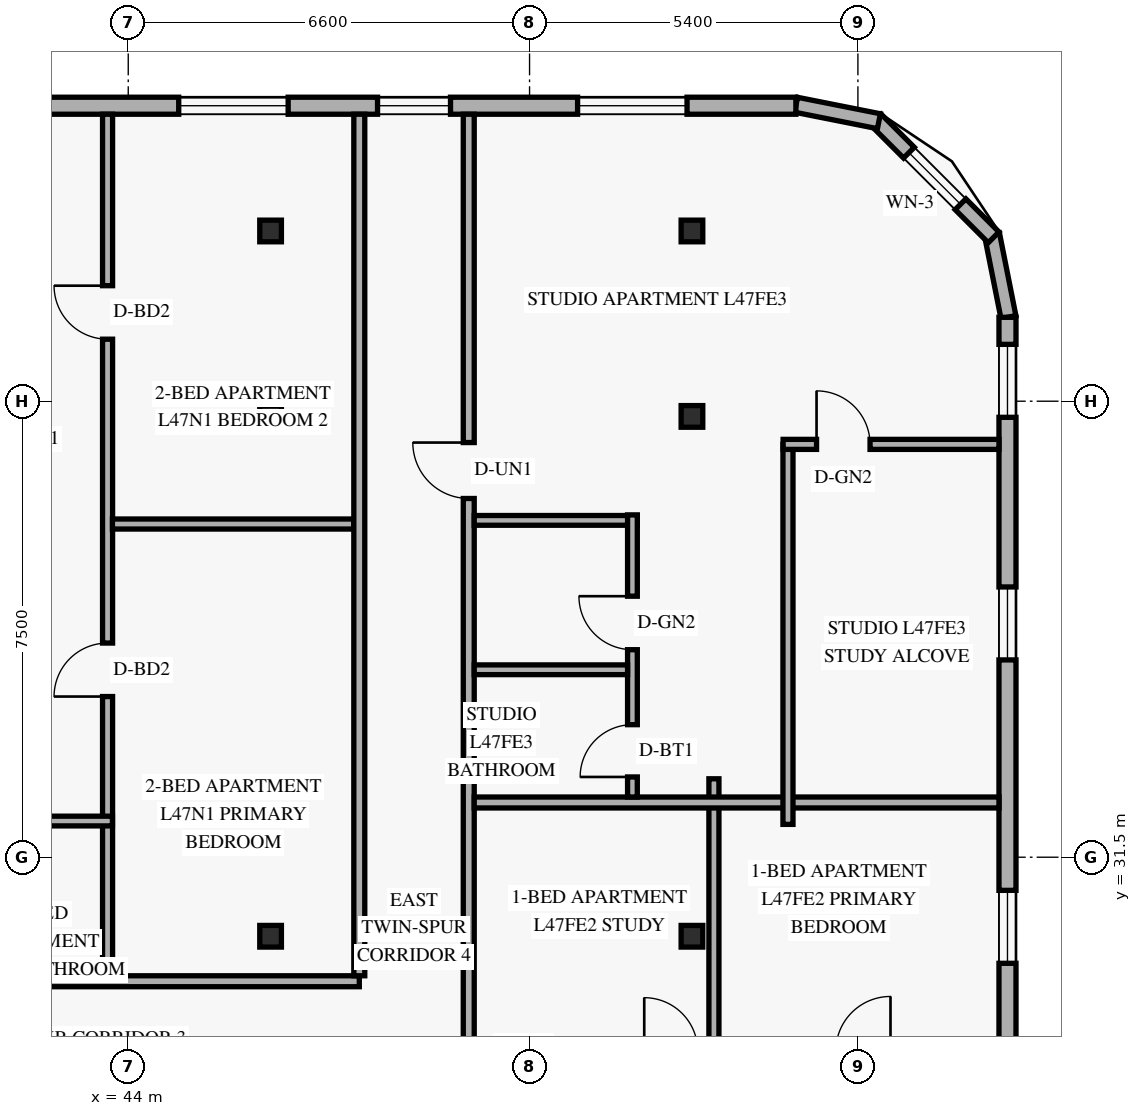
"""IFC4 building model, lengths in metres.
Left out: names, types, materials, properties, quantities, classifications, styles, units other than length and angle.
Written with IfcOpenShell. Run it as: python <this file> out.ifc"""

import sys

from ifc_helpers import new_model, si_unit, direction, frame, frame_2d, origin, origin_2d, place, context, subcontext, project, spatial, rectangle, hollow_rectangle, extrude, element, fill, save


model = new_model("IFC4")
c1 = context("Model", 3, precision=1e-05, world=origin(), true_north=direction((0.0, 1.0)))
c2 = subcontext(c1, "Body", "Model", "MODEL_VIEW")
j1 = project(units=[si_unit("LENGTHUNIT", "METRE"), si_unit("PLANEANGLEUNIT", "RADIAN")], contexts=[c1])
p1 = place(None, origin())
s1 = spatial("IfcSite", under=j1, at=p1, CompositionType="ELEMENT")
p2 = place(p1, origin())
s2 = spatial("IfcBuilding", under=s1, at=p2, CompositionType="ELEMENT")
p3 = place(p2, frame((0.0, 0.0, 181.2)))
s3 = spatial("IfcBuildingStorey", under=s2, at=p3, CompositionType="ELEMENT", Elevation=181.2)
for number, where, z_axis, x_axis in (
    (1, (46.278, 30.2, 0.0), (0.035, 0.0, 0.999), (0.0, 1.0, 0.0)),
    (2, (46.278, 38.75, 0.0), (0.035, 0.0, 0.999), (0.0, 1.0, 0.0)),
    (3, (46.278, 41.8, 0.0), (0.035, 0.0, 0.999), (0.0, 1.0, 0.0)),
):
    element("IfcColumn", number, at=place(p3, frame(where, z_axis=z_axis, x_axis=x_axis)), inside=s3, PredefinedType="COLUMN", context=c2, shape_type="SweptSolid", body=[
        extrude(hollow_rectangle(XDim=0.356, YDim=0.356, WallThickness=0.016, at=origin_2d()), origin(), (0.0, 0.0, 1.0), 3.602),
    ])
for number, where, z_axis, x_axis in (
    (4, (53.167, 30.2, 0.0), (0.058, 0.0, 0.998), (0.0, 1.0, 0.0)),
    (5, (53.167, 38.75, 0.0), (0.058, 0.0, 0.998), (0.0, 1.0, 0.0)),
    (6, (53.167, 41.8, 0.0), (0.058, 0.0, 0.998), (0.0, 1.0, 0.0)),
):
    element("IfcColumn", number, at=place(p3, frame(where, z_axis=z_axis, x_axis=x_axis)), inside=s3, PredefinedType="COLUMN", context=c2, shape_type="SweptSolid", body=[
        extrude(hollow_rectangle(XDim=0.356, YDim=0.356, WallThickness=0.016, at=origin_2d()), origin(), (0.0, 0.0, 1.0), 3.606),
    ])
p4 = place(p3, frame((58.476, 40.384, 0.0), z_axis=(0.0, 0.0, 1.0), x_axis=(-0.19496651342, 0.980809899341, 0.0)))
e7 = element("IfcWall", 7, at=p4, inside=s3, PredefinedType="SOLIDWALL", context=c2, shape_type="SweptSolid", body=[
    extrude(rectangle(XDim=1.389, YDim=0.25, at=frame_2d((0.694, 0.0))), origin(), (0.0, 0.0, 1.0), 3.36),
])
p5 = place(p3, frame((58.232, 41.695, 0.0), z_axis=(0.0, 0.0, 1.0), x_axis=(-0.707106781187, 0.707106781187, 0.0)))
e8 = element("IfcWall", 8, at=p5, inside=s3, PredefinedType="SOLIDWALL", context=c2, shape_type="SweptSolid", body=[
    extrude(rectangle(XDim=2.739, YDim=0.25, at=frame_2d((1.37, 0.0))), origin(), (0.0, 0.0, 1.0), 3.36),
])
p6 = place(p5, frame((0.77, 0.0, 0.85)))
e9 = element("IfcOpeningElement", 9, at=p6, cuts=e8, PredefinedType="OPENING", context=c2, shape_type="SweptSolid", body=[
    extrude(rectangle(XDim=1.2, YDim=1.5, at=frame_2d((0.6, 0.75))), frame((0.0, 0.135, 0.0), z_axis=(0.0, -1.0, 0.0), x_axis=(1.0, 0.0, 0.0)), (0.0, 0.0, 1.0), 0.27),
])
p7 = place(p3, frame((56.345, 43.605, 0.0), z_axis=(0.0, 0.0, 1.0), x_axis=(-0.980809899341, 0.19496651342, 0.0)))
e10 = element("IfcWall", 10, at=p7, inside=s3, PredefinedType="SOLIDWALL", context=c2, shape_type="SweptSolid", body=[
    extrude(rectangle(XDim=1.389, YDim=0.25, at=frame_2d((0.694, 0.0))), origin(), (0.0, 0.0, 1.0), 3.36),
])
p8 = place(p3, frame((58.46, 7.62, 0.0), z_axis=(0.0, 0.0, 1.0), x_axis=(0.0, 1.0, 0.0)))
e11 = element("IfcWall", 11, at=p8, inside=s3, PredefinedType="SOLIDWALL", context=c2, shape_type="SweptSolid", body=[
    extrude(rectangle(XDim=32.76, YDim=0.28, at=frame_2d((16.38, 0.0))), origin(), (0.0, 0.0, 1.0), 3.36),
])
p9 = place(p8, frame((4.79, 0.0, 0.85)))
e12 = element("IfcOpeningElement", 12, at=p9, cuts=e11, PredefinedType="OPENING", context=c2, shape_type="SweptSolid", body=[
    extrude(rectangle(XDim=1.2, YDim=1.5, at=frame_2d((0.6, 0.75))), frame((0.0, 0.15, 0.0), z_axis=(0.0, -1.0, 0.0), x_axis=(1.0, 0.0, 0.0)), (0.0, 0.0, 1.0), 0.3),
])
p10 = place(p8, frame((11.425, 0.0, 0.85)))
e13 = element("IfcOpeningElement", 13, at=p10, cuts=e11, PredefinedType="OPENING", context=c2, shape_type="SweptSolid", body=[
    extrude(rectangle(XDim=1.2, YDim=1.5, at=frame_2d((0.6, 0.75))), frame((0.0, 0.15, 0.0), z_axis=(0.0, -1.0, 0.0), x_axis=(1.0, 0.0, 0.0)), (0.0, 0.0, 1.0), 0.3),
])
p11 = place(p8, frame((16.38, 0.0, 0.85)))
e14 = element("IfcOpeningElement", 14, at=p11, cuts=e11, PredefinedType="OPENING", context=c2, shape_type="SweptSolid", body=[
    extrude(rectangle(XDim=1.2, YDim=1.5, at=frame_2d((0.6, 0.75))), frame((0.0, 0.15, 0.0), z_axis=(0.0, -1.0, 0.0), x_axis=(1.0, 0.0, 0.0)), (0.0, 0.0, 1.0), 0.3),
])
p12 = place(p8, frame((22.135, 0.0, 0.85)))
e15 = element("IfcOpeningElement", 15, at=p12, cuts=e11, PredefinedType="OPENING", context=c2, shape_type="SweptSolid", body=[
    extrude(rectangle(XDim=1.2, YDim=1.5, at=frame_2d((0.6, 0.75))), frame((0.0, 0.15, 0.0), z_axis=(0.0, -1.0, 0.0), x_axis=(1.0, 0.0, 0.0)), (0.0, 0.0, 1.0), 0.3),
])
p13 = place(p8, frame((27.125, 0.0, 0.85)))
e16 = element("IfcOpeningElement", 16, at=p13, cuts=e11, PredefinedType="OPENING", context=c2, shape_type="SweptSolid", body=[
    extrude(rectangle(XDim=1.2, YDim=1.5, at=frame_2d((0.6, 0.75))), frame((0.0, 0.15, 0.0), z_axis=(0.0, -1.0, 0.0), x_axis=(1.0, 0.0, 0.0)), (0.0, 0.0, 1.0), 0.3),
])
p14 = place(p8, frame((31.115, 0.0, 0.85)))
e17 = element("IfcOpeningElement", 17, at=p14, cuts=e11, PredefinedType="OPENING", context=c2, shape_type="SweptSolid", body=[
    extrude(rectangle(XDim=1.2, YDim=1.5, at=frame_2d((0.6, 0.75))), frame((0.0, 0.15, 0.0), z_axis=(0.0, -1.0, 0.0), x_axis=(1.0, 0.0, 0.0)), (0.0, 0.0, 1.0), 0.3),
])
p15 = place(p3, frame((54.98, 43.86, 0.0), z_axis=(0.0, 0.0, 1.0), x_axis=(-1.0, 0.0, 0.0)))
e18 = element("IfcWall", 18, at=p15, inside=s3, PredefinedType="SOLIDWALL", context=c2, shape_type="SweptSolid", body=[
    extrude(rectangle(XDim=33.76, YDim=0.28, at=frame_2d((16.88, 0.0))), origin(), (0.0, 0.0, 1.0), 3.36),
])
p16 = place(p15, frame((28.055, 0.0, 0.85)))
e19 = element("IfcOpeningElement", 19, at=p16, cuts=e18, PredefinedType="OPENING", context=c2, shape_type="SweptSolid", body=[
    extrude(rectangle(XDim=1.8, YDim=1.6, at=frame_2d((0.9, 0.8))), frame((0.0, 0.15, 0.0), z_axis=(0.0, -1.0, 0.0), x_axis=(1.0, 0.0, 0.0)), (0.0, 0.0, 1.0), 0.3),
])
p17 = place(p15, frame((21.17, 0.0, 0.85)))
e20 = element("IfcOpeningElement", 20, at=p17, cuts=e18, PredefinedType="OPENING", context=c2, shape_type="SweptSolid", body=[
    extrude(rectangle(XDim=1.8, YDim=1.6, at=frame_2d((0.9, 0.8))), frame((0.0, 0.15, 0.0), z_axis=(0.0, -1.0, 0.0), x_axis=(1.0, 0.0, 0.0)), (0.0, 0.0, 1.0), 0.3),
])
p18 = place(p15, frame((17.44, 0.0, 0.85)))
e21 = element("IfcOpeningElement", 21, at=p18, cuts=e18, PredefinedType="OPENING", context=c2, shape_type="SweptSolid", body=[
    extrude(rectangle(XDim=1.8, YDim=1.6, at=frame_2d((0.9, 0.8))), frame((0.0, 0.15, 0.0), z_axis=(0.0, -1.0, 0.0), x_axis=(1.0, 0.0, 0.0)), (0.0, 0.0, 1.0), 0.3),
])
p19 = place(p15, frame((13.32, 0.0, 0.85)))
e22 = element("IfcOpeningElement", 22, at=p19, cuts=e18, PredefinedType="OPENING", context=c2, shape_type="SweptSolid", body=[
    extrude(rectangle(XDim=1.8, YDim=1.6, at=frame_2d((0.9, 0.8))), frame((0.0, 0.15, 0.0), z_axis=(0.0, -1.0, 0.0), x_axis=(1.0, 0.0, 0.0)), (0.0, 0.0, 1.0), 0.3),
])
p20 = place(p15, frame((8.35, 0.0, 0.85)))
e23 = element("IfcOpeningElement", 23, at=p20, cuts=e18, PredefinedType="OPENING", context=c2, shape_type="SweptSolid", body=[
    extrude(rectangle(XDim=1.8, YDim=1.6, at=frame_2d((0.9, 0.8))), frame((0.0, 0.15, 0.0), z_axis=(0.0, -1.0, 0.0), x_axis=(1.0, 0.0, 0.0)), (0.0, 0.0, 1.0), 0.3),
])
p21 = place(p15, frame((5.68, 0.0, 0.85)))
e24 = element("IfcOpeningElement", 24, at=p21, cuts=e18, PredefinedType="OPENING", context=c2, shape_type="SweptSolid", body=[
    extrude(rectangle(XDim=1.2, YDim=1.5, at=frame_2d((0.6, 0.75))), frame((0.0, 0.15, 0.0), z_axis=(0.0, -1.0, 0.0), x_axis=(1.0, 0.0, 0.0)), (0.0, 0.0, 1.0), 0.3),
])
p22 = place(p15, frame((1.79, 0.0, 0.85)))
e25 = element("IfcOpeningElement", 25, at=p22, cuts=e18, PredefinedType="OPENING", context=c2, shape_type="SweptSolid", body=[
    extrude(rectangle(XDim=1.8, YDim=1.6, at=frame_2d((0.9, 0.8))), frame((0.0, 0.15, 0.0), z_axis=(0.0, -1.0, 0.0), x_axis=(1.0, 0.0, 0.0)), (0.0, 0.0, 1.0), 0.3),
])
p23 = place(p3, frame((35.51, 29.46, 0.0), z_axis=(0.0, 0.0, 1.0), x_axis=(1.0, 0.0, 0.0)))
e26 = element("IfcWall", 26, at=p23, inside=s3, PredefinedType="STANDARD", context=c2, shape_type="SweptSolid", body=[
    extrude(rectangle(XDim=12.29, YDim=0.18, at=frame_2d((6.145, 0.0))), origin(), (0.0, 0.0, 1.0), 2.73),
])
p24 = place(p23, frame((0.32, 0.0, 0.0)))
e27 = element("IfcOpeningElement", 27, at=p24, cuts=e26, PredefinedType="OPENING", context=c2, shape_type="SweptSolid", body=[
    extrude(rectangle(XDim=0.92, YDim=2.15, at=frame_2d((0.46, 1.075))), frame((0.0, 0.1, 0.0), z_axis=(0.0, -1.0, 0.0), x_axis=(1.0, 0.0, 0.0)), (0.0, 0.0, 1.0), 0.2),
])
p25 = place(p3, frame((43.66, 29.55, 0.0), z_axis=(0.0, 0.0, 1.0), x_axis=(0.0, 1.0, 0.0)))
e28 = element("IfcWall", 28, at=p25, inside=s3, PredefinedType="PARTITIONING", context=c2, shape_type="SweptSolid", body=[
    extrude(rectangle(XDim=14.17, YDim=0.165, at=frame_2d((7.085, 0.0))), origin(), (0.0, 0.0, 1.0), 2.73),
])
p26 = place(p25, frame((4.593, 0.0, 0.0)))
e29 = element("IfcOpeningElement", 29, at=p26, cuts=e28, PredefinedType="OPENING", context=c2, shape_type="SweptSolid", body=[
    extrude(rectangle(XDim=0.88, YDim=2.14, at=frame_2d((0.44, 1.07))), frame((0.0, 0.093, 0.0), z_axis=(0.0, -1.0, 0.0), x_axis=(1.0, 0.0, 0.0)), (0.0, 0.0, 1.0), 0.185),
])
p27 = place(p25, frame((10.47, 0.0, 0.0)))
e30 = element("IfcOpeningElement", 30, at=p27, cuts=e28, PredefinedType="OPENING", context=c2, shape_type="SweptSolid", body=[
    extrude(rectangle(XDim=0.88, YDim=2.14, at=frame_2d((0.44, 1.07))), frame((0.0, 0.093, 0.0), z_axis=(0.0, -1.0, 0.0), x_axis=(1.0, 0.0, 0.0)), (0.0, 0.0, 1.0), 0.185),
])
p28 = place(p3, frame((39.03, 32.095, 0.0), z_axis=(0.0, 0.0, 1.0), x_axis=(1.0, 0.0, 0.0)))
e31 = element("IfcWall", 31, at=p28, inside=s3, PredefinedType="PLUMBINGWALL", context=c2, shape_type="SweptSolid", body=[
    extrude(rectangle(XDim=4.71, YDim=0.16, at=frame_2d((2.355, 0.0))), origin(), (0.0, 0.0, 1.0), 3.36),
])
p29 = place(p28, frame((0.38, 0.0, 0.0)))
e32 = element("IfcOpeningElement", 32, at=p29, cuts=e31, PredefinedType="OPENING", context=c2, shape_type="SweptSolid", body=[
    extrude(rectangle(XDim=0.88, YDim=2.12, at=frame_2d((0.44, 1.06))), frame((0.0, 0.09, 0.0), z_axis=(0.0, -1.0, 0.0), x_axis=(1.0, 0.0, 0.0)), (0.0, 0.0, 1.0), 0.18),
])
p30 = place(p28, frame((2.786, 0.0, 0.0)))
e33 = element("IfcOpeningElement", 33, at=p30, cuts=e31, PredefinedType="OPENING", context=c2, shape_type="SweptSolid", body=[
    extrude(rectangle(XDim=0.86, YDim=2.12, at=frame_2d((0.43, 1.06))), frame((0.0, 0.09, 0.0), z_axis=(0.0, -1.0, 0.0), x_axis=(1.0, 0.0, 0.0)), (0.0, 0.0, 1.0), 0.18),
])
p31 = place(p3, frame((43.74, 36.98, 0.0), z_axis=(0.0, 0.0, 1.0), x_axis=(1.0, 0.0, 0.0)))
e34 = element("IfcWall", 34, at=p31, inside=s3, PredefinedType="PARTITIONING", context=c2, shape_type="SweptSolid", body=[
    extrude(rectangle(XDim=3.97, YDim=0.165, at=frame_2d((1.985, 0.0))), origin(), (0.0, 0.0, 1.0), 2.73),
])
p32 = place(p3, frame((49.6, 4.28, 0.0), z_axis=(0.0, 0.0, 1.0), x_axis=(0.0, 1.0, 0.0)))
e35 = element("IfcWall", 35, at=p32, inside=s3, PredefinedType="STANDARD", context=c2, shape_type="SweptSolid", body=[
    extrude(rectangle(XDim=39.44, YDim=0.18, at=frame_2d((19.72, 0.0))), origin(), (0.0, 0.0, 1.0), 2.73),
])
p33 = place(p32, frame((8.52, 0.0, 0.0)))
e36 = element("IfcOpeningElement", 36, at=p33, cuts=e35, PredefinedType="OPENING", context=c2, shape_type="SweptSolid", body=[
    extrude(rectangle(XDim=0.92, YDim=2.15, at=frame_2d((0.46, 1.075))), frame((0.0, 0.1, 0.0), z_axis=(0.0, -1.0, 0.0), x_axis=(1.0, 0.0, 0.0)), (0.0, 0.0, 1.0), 0.2),
])
p34 = place(p32, frame((18.052, 0.0, 0.0)))
e37 = element("IfcOpeningElement", 37, at=p34, cuts=e35, PredefinedType="OPENING", context=c2, shape_type="SweptSolid", body=[
    extrude(rectangle(XDim=0.92, YDim=2.15, at=frame_2d((0.46, 1.075))), frame((0.0, 0.1, 0.0), z_axis=(0.0, -1.0, 0.0), x_axis=(1.0, 0.0, 0.0)), (0.0, 0.0, 1.0), 0.2),
])
p35 = place(p32, frame((33.12, 0.0, 0.0)))
e38 = element("IfcOpeningElement", 38, at=p35, cuts=e35, PredefinedType="OPENING", context=c2, shape_type="SweptSolid", body=[
    extrude(rectangle(XDim=0.92, YDim=2.15, at=frame_2d((0.46, 1.075))), frame((0.0, 0.1, 0.0), z_axis=(0.0, -1.0, 0.0), x_axis=(1.0, 0.0, 0.0)), (0.0, 0.0, 1.0), 0.2),
])
p36 = place(p3, frame((47.8, 29.55, 0.0), z_axis=(0.0, 0.0, 1.0), x_axis=(0.0, 1.0, 0.0)))
e39 = element("IfcWall", 39, at=p36, inside=s3, PredefinedType="STANDARD", context=c2, shape_type="SweptSolid", body=[
    extrude(rectangle(XDim=14.17, YDim=0.18, at=frame_2d((7.085, 0.0))), origin(), (0.0, 0.0, 1.0), 2.73),
])
p37 = place(p3, frame((53.632, 28.23, 0.0), z_axis=(0.0, 0.0, 1.0), x_axis=(0.0, 1.0, 0.0)))
e40 = element("IfcWall", 40, at=p37, inside=s3, PredefinedType="PARTITIONING", context=c2, shape_type="SweptSolid", body=[
    extrude(rectangle(XDim=4.56, YDim=0.165, at=frame_2d((2.28, 0.0))), origin(), (0.0, 0.0, 1.0), 3.36),
])
p38 = place(p3, frame((49.69, 32.4, 0.0), z_axis=(0.0, 0.0, 1.0), x_axis=(1.0, 0.0, 0.0)))
e41 = element("IfcWall", 41, at=p38, inside=s3, PredefinedType="PARTITIONING", context=c2, shape_type="SweptSolid", body=[
    extrude(rectangle(XDim=8.63, YDim=0.18, at=frame_2d((4.315, 0.0))), origin(), (0.0, 0.0, 1.0), 2.879),
])
p39 = place(p3, frame((49.69, 37.04, 0.0), z_axis=(0.0, 0.0, 1.0), x_axis=(1.0, 0.0, 0.0)))
e42 = element("IfcWall", 42, at=p39, inside=s3, PredefinedType="PLUMBINGWALL", context=c2, shape_type="SweptSolid", body=[
    extrude(rectangle(XDim=2.682, YDim=0.16, at=frame_2d((1.341, 0.0))), origin(), (0.0, 0.0, 1.0), 3.36),
])
p40 = place(p3, frame((52.292, 32.49, 0.0), z_axis=(0.0, 0.0, 1.0), x_axis=(0.0, 1.0, 0.0)))
e43 = element("IfcWall", 43, at=p40, inside=s3, PredefinedType="PLUMBINGWALL", context=c2, shape_type="SweptSolid", body=[
    extrude(rectangle(XDim=4.64, YDim=0.16, at=frame_2d((2.32, 0.0))), origin(), (0.0, 0.0, 1.0), 2.984),
])
p41 = place(p40, frame((0.33, 0.0, 0.0)))
e44 = element("IfcOpeningElement", 44, at=p41, cuts=e43, PredefinedType="OPENING", context=c2, shape_type="SweptSolid", body=[
    extrude(rectangle(XDim=0.86, YDim=2.12, at=frame_2d((0.43, 1.06))), frame((0.0, 0.09, 0.0), z_axis=(0.0, -1.0, 0.0), x_axis=(1.0, 0.0, 0.0)), (0.0, 0.0, 1.0), 0.18),
])
p42 = place(p40, frame((2.423, 0.0, 0.0)))
e45 = element("IfcOpeningElement", 45, at=p42, cuts=e43, PredefinedType="OPENING", context=c2, shape_type="SweptSolid", body=[
    extrude(rectangle(XDim=0.88, YDim=2.12, at=frame_2d((0.44, 1.06))), frame((0.0, 0.09, 0.0), z_axis=(0.0, -1.0, 0.0), x_axis=(1.0, 0.0, 0.0)), (0.0, 0.0, 1.0), 0.18),
])
p43 = place(p3, frame((49.69, 34.583, 0.0), z_axis=(0.0, 0.0, 1.0), x_axis=(1.0, 0.0, 0.0)))
e46 = element("IfcWall", 46, at=p43, inside=s3, PredefinedType="PLUMBINGWALL", context=c2, shape_type="SweptSolid", body=[
    extrude(rectangle(XDim=2.522, YDim=0.16, at=frame_2d((1.261, 0.0))), origin(), (0.0, 0.0, 1.0), 2.984),
])
p44 = place(p3, frame((54.85, 32.04, 0.0), z_axis=(0.0, 0.0, 1.0), x_axis=(0.0, 1.0, 0.0)))
e47 = element("IfcWall", 47, at=p44, inside=s3, PredefinedType="PARTITIONING", context=c2, shape_type="SweptSolid", body=[
    extrude(rectangle(XDim=6.25, YDim=0.165, at=frame_2d((3.125, 0.0))), origin(), (0.0, 0.0, 1.0), 3.36),
])
p45 = place(p3, frame((54.77, 38.29, 0.0), z_axis=(0.0, 0.0, 1.0), x_axis=(1.0, 0.0, 0.0)))
e48 = element("IfcWall", 48, at=p45, inside=s3, PredefinedType="PARTITIONING", context=c2, shape_type="SweptSolid", body=[
    extrude(rectangle(XDim=3.55, YDim=0.165, at=frame_2d((1.775, 0.0))), origin(), (0.0, 0.0, 1.0), 3.36),
])
p46 = place(p45, frame((0.55, 0.0, 0.0)))
e49 = element("IfcOpeningElement", 49, at=p46, cuts=e48, PredefinedType="OPENING", context=c2, shape_type="SweptSolid", body=[
    extrude(rectangle(XDim=0.88, YDim=2.12, at=frame_2d((0.44, 1.06))), frame((0.0, 0.093, 0.0), z_axis=(0.0, -1.0, 0.0), x_axis=(1.0, 0.0, 0.0)), (0.0, 0.0, 1.0), 0.185),
])
p47 = place(p6, origin())
e50 = element("IfcWindow", 50, at=p47, inside=s3, PartitioningType="SINGLE_PANEL", PredefinedType="WINDOW", context=c2, shape_type="SweptSolid", body=[
    extrude(rectangle(XDim=1.2, YDim=1.5, at=frame_2d((0.6, 0.75))), frame((0.0, 0.03, 0.0), z_axis=(0.0, -1.0, 0.0), x_axis=(1.0, 0.0, 0.0)), (0.0, 0.0, 1.0), 0.06),
])
fill(e9, e50)
p48 = place(p12, origin())
e51 = element("IfcWindow", 51, at=p48, inside=s3, PartitioningType="SINGLE_PANEL", PredefinedType="WINDOW", context=c2, shape_type="SweptSolid", body=[
    extrude(rectangle(XDim=1.2, YDim=1.5, at=frame_2d((0.6, 0.75))), frame((0.0, 0.03, 0.0), z_axis=(0.0, -1.0, 0.0), x_axis=(1.0, 0.0, 0.0)), (0.0, 0.0, 1.0), 0.06),
])
fill(e15, e51)
p49 = place(p13, origin())
e52 = element("IfcWindow", 52, at=p49, inside=s3, PartitioningType="SINGLE_PANEL", PredefinedType="WINDOW", context=c2, shape_type="SweptSolid", body=[
    extrude(rectangle(XDim=1.2, YDim=1.5, at=frame_2d((0.6, 0.75))), frame((0.0, 0.03, 0.0), z_axis=(0.0, -1.0, 0.0), x_axis=(1.0, 0.0, 0.0)), (0.0, 0.0, 1.0), 0.06),
])
fill(e16, e52)
p50 = place(p14, origin())
e53 = element("IfcWindow", 53, at=p50, inside=s3, PartitioningType="SINGLE_PANEL", PredefinedType="WINDOW", context=c2, shape_type="SweptSolid", body=[
    extrude(rectangle(XDim=1.2, YDim=1.5, at=frame_2d((0.6, 0.75))), frame((0.0, 0.03, 0.0), z_axis=(0.0, -1.0, 0.0), x_axis=(1.0, 0.0, 0.0)), (0.0, 0.0, 1.0), 0.06),
])
fill(e17, e53)
p51 = place(p20, origin())
e54 = element("IfcWindow", 54, at=p51, inside=s3, PartitioningType="SINGLE_PANEL", PredefinedType="WINDOW", context=c2, shape_type="SweptSolid", body=[
    extrude(rectangle(XDim=1.8, YDim=1.6, at=frame_2d((0.9, 0.8))), frame((0.0, 0.03, 0.0), z_axis=(0.0, -1.0, 0.0), x_axis=(1.0, 0.0, 0.0)), (0.0, 0.0, 1.0), 0.06),
])
fill(e23, e54)
p52 = place(p21, origin())
e55 = element("IfcWindow", 55, at=p52, inside=s3, PartitioningType="SINGLE_PANEL", PredefinedType="WINDOW", context=c2, shape_type="SweptSolid", body=[
    extrude(rectangle(XDim=1.2, YDim=1.5, at=frame_2d((0.6, 0.75))), frame((0.0, 0.03, 0.0), z_axis=(0.0, -1.0, 0.0), x_axis=(1.0, 0.0, 0.0)), (0.0, 0.0, 1.0), 0.06),
])
fill(e24, e55)
p53 = place(p22, origin())
e56 = element("IfcWindow", 56, at=p53, inside=s3, PartitioningType="SINGLE_PANEL", PredefinedType="WINDOW", context=c2, shape_type="SweptSolid", body=[
    extrude(rectangle(XDim=1.8, YDim=1.6, at=frame_2d((0.9, 0.8))), frame((0.0, 0.03, 0.0), z_axis=(0.0, -1.0, 0.0), x_axis=(1.0, 0.0, 0.0)), (0.0, 0.0, 1.0), 0.06),
])
fill(e25, e56)
p54 = place(p26, origin())
e57 = element("IfcDoor", 57, at=p54, inside=s3, OperationType="SINGLE_SWING_LEFT", PredefinedType="DOOR", context=c2, shape_type="SweptSolid", body=[
    extrude(rectangle(XDim=0.88, YDim=2.14, at=frame_2d((0.44, 1.07))), frame((0.0, 0.025, 0.0), z_axis=(0.0, -1.0, 0.0), x_axis=(1.0, 0.0, 0.0)), (0.0, 0.0, 1.0), 0.05),
])
fill(e29, e57)
p55 = place(p27, origin())
e58 = element("IfcDoor", 58, at=p55, inside=s3, OperationType="SINGLE_SWING_RIGHT", PredefinedType="DOOR", context=c2, shape_type="SweptSolid", body=[
    extrude(rectangle(XDim=0.88, YDim=2.14, at=frame_2d((0.44, 1.07))), frame((0.0, 0.025, 0.0), z_axis=(0.0, -1.0, 0.0), x_axis=(1.0, 0.0, 0.0)), (0.0, 0.0, 1.0), 0.05),
])
fill(e30, e58)
p56 = place(p46, origin())
e59 = element("IfcDoor", 59, at=p56, inside=s3, OperationType="SINGLE_SWING_LEFT", PredefinedType="DOOR", context=c2, shape_type="SweptSolid", body=[
    extrude(rectangle(XDim=0.88, YDim=2.12, at=frame_2d((0.44, 1.06))), frame((0.0, 0.025, 0.0), z_axis=(0.0, -1.0, 0.0), x_axis=(1.0, 0.0, 0.0)), (0.0, 0.0, 1.0), 0.05),
])
fill(e49, e59)
p57 = place(p35, origin())
e60 = element("IfcDoor", 60, at=p57, inside=s3, OperationType="SINGLE_SWING_RIGHT", PredefinedType="DOOR", context=c2, shape_type="SweptSolid", body=[
    extrude(rectangle(XDim=0.92, YDim=2.15, at=frame_2d((0.46, 1.075))), frame((0.0, 0.025, 0.0), z_axis=(0.0, -1.0, 0.0), x_axis=(1.0, 0.0, 0.0)), (0.0, 0.0, 1.0), 0.05),
])
fill(e38, e60)
p58 = place(p41, origin())
e61 = element("IfcDoor", 61, at=p58, inside=s3, OperationType="SINGLE_SWING_LEFT", PredefinedType="DOOR", context=c2, shape_type="SweptSolid", body=[
    extrude(rectangle(XDim=0.86, YDim=2.12, at=frame_2d((0.43, 1.06))), frame((0.0, 0.025, 0.0), z_axis=(0.0, -1.0, 0.0), x_axis=(1.0, 0.0, 0.0)), (0.0, 0.0, 1.0), 0.05),
])
fill(e44, e61)
p59 = place(p42, origin())
e62 = element("IfcDoor", 62, at=p59, inside=s3, OperationType="SINGLE_SWING_RIGHT", PredefinedType="DOOR", context=c2, shape_type="SweptSolid", body=[
    extrude(rectangle(XDim=0.88, YDim=2.12, at=frame_2d((0.44, 1.06))), frame((0.0, 0.025, 0.0), z_axis=(0.0, -1.0, 0.0), x_axis=(1.0, 0.0, 0.0)), (0.0, 0.0, 1.0), 0.05),
])
fill(e45, e62)
save(model, sys.argv[1])
